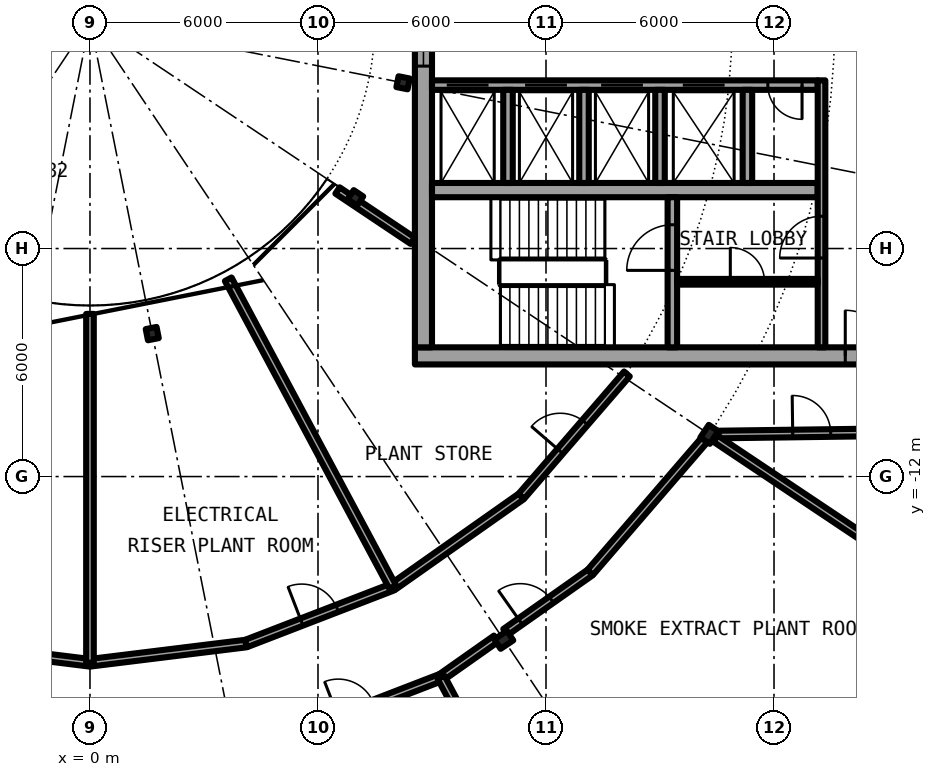
"""IFC4 building model, lengths in metres.
Left out: names, types, materials, properties, quantities, classifications, styles, units other than length and angle.
Written with IfcOpenShell. Run it as: python <this file> out.ifc"""

import sys

from ifc_helpers import new_model, si_unit, direction, frame, frame_2d, origin, origin_2d, place, context, subcontext, project, spatial, rectangle, i_section, extrude, element, fill, save


model = new_model("IFC4")
c1 = context("Model", 3, precision=1e-05, world=origin(), true_north=direction((0.0, 1.0)))
c2 = subcontext(c1, "Body", "Model", "MODEL_VIEW")
j1 = project(units=[si_unit("LENGTHUNIT", "METRE"), si_unit("PLANEANGLEUNIT", "RADIAN")], contexts=[c1])
p1 = place(None, origin())
s1 = spatial("IfcSite", under=j1, at=p1, CompositionType="ELEMENT")
p2 = place(p1, origin())
s2 = spatial("IfcBuilding", under=s1, at=p2, CompositionType="ELEMENT")
p3 = place(p2, frame((0.0, 0.0, 186.0)))
s3 = spatial("IfcBuildingStorey", under=s2, at=p3, CompositionType="ELEMENT", Elevation=186.0)
for number, where, z_axis, x_axis in (
    (1, (10.889, -16.297, 0.0), (0.0, 0.0, 1.0), (0.556, -0.831, 0.0)),
    (2, (16.297, -10.889, 0.0), (0.0, 0.0, 1.0), (0.831, -0.556, 0.0)),
):
    element("IfcColumn", number, at=place(p3, frame(where, z_axis=z_axis, x_axis=x_axis)), inside=s3, PredefinedType="COLUMN", context=c2, shape_type="SweptSolid", body=[
        extrude(i_section(OverallWidth=0.3, OverallDepth=0.4, WebThickness=0.013, FlangeThickness=0.024, FilletRadius=0.027, at=origin_2d()), origin(), (0.0, 0.0, 1.0), 4.2),
    ])
for number, where, z_axis, x_axis in (
    (3, (1.639, -8.239, 0.0), (0.0, 0.0, 1.0), (0.195, -0.981, 0.0)),
    (4, (6.984, -4.667, 0.0), (0.0, 0.0, 1.0), (0.831, -0.556, 0.0)),
    (5, (8.239, -1.639, 0.0), (0.0, 0.0, 1.0), (0.981, -0.195, 0.0)),
):
    element("IfcColumn", number, at=place(p3, frame(where, z_axis=z_axis, x_axis=x_axis)), inside=s3, PredefinedType="COLUMN", context=c2, shape_type="SweptSolid", body=[
        extrude(i_section(OverallWidth=0.3, OverallDepth=0.29, WebThickness=0.009, FlangeThickness=0.014, FilletRadius=0.027, at=origin_2d()), origin(), (0.0, 0.0, 1.0), 4.2),
    ])
p4 = place(p3, frame((8.55, -8.825, 0.0), z_axis=(0.0, 0.0, 1.0), x_axis=(1.0, 0.0, 0.0)))
e6 = element("IfcWall", 6, at=p4, inside=s3, PredefinedType="SHEAR", context=c2, shape_type="SweptSolid", body=[
    extrude(rectangle(XDim=13.5, YDim=0.45, at=frame_2d((6.75, 0.0))), origin(), (0.0, 0.0, 1.0), 4.2),
])
p5 = place(p4, frame((11.325, 0.0, 0.0)))
e7 = element("IfcOpeningElement", 7, at=p5, cuts=e6, PredefinedType="OPENING", context=c2, shape_type="SweptSolid", body=[
    extrude(rectangle(XDim=1.2, YDim=2.3, at=frame_2d((0.6, 1.15))), frame((0.0, 0.235, 0.0), z_axis=(0.0, -1.0, 0.0), x_axis=(1.0, 0.0, 0.0)), (0.0, 0.0, 1.0), 0.47),
])
p6 = place(p3, frame((8.775, -8.6, 0.0), z_axis=(0.0, 0.0, 1.0), x_axis=(0.0, 1.0, 0.0)))
e8 = element("IfcWall", 8, at=p6, inside=s3, PredefinedType="SHEAR", context=c2, shape_type="SweptSolid", body=[
    extrude(rectangle(XDim=17.2, YDim=0.45, at=frame_2d((8.6, 0.0))), origin(), (0.0, 0.0, 1.0), 4.2),
])
p7 = place(p6, frame((7.4, 0.0, 0.1)))
e9 = element("IfcOpeningElement", 9, at=p7, cuts=e8, PredefinedType="OPENING", context=c2, shape_type="SweptSolid", body=[
    extrude(rectangle(XDim=2.4, YDim=2.2, at=frame_2d((1.2, 1.1))), frame((0.0, 0.235, 0.0), z_axis=(0.0, -1.0, 0.0), x_axis=(1.0, 0.0, 0.0)), (0.0, 0.0, 1.0), 0.47),
])
p8 = place(p3, frame((19.15, -1.7, 0.0), z_axis=(0.0, 0.0, 1.0), x_axis=(-1.0, 0.0, 0.0)))
e10 = element("IfcWall", 10, at=p8, inside=s3, PredefinedType="SHEAR", context=c2, shape_type="SweptSolid", body=[
    extrude(rectangle(XDim=10.15, YDim=0.25, at=frame_2d((5.075, 0.0))), origin(), (0.0, 0.0, 1.0), 4.2),
])
p9 = place(p8, frame((8.663, 0.0, 0.0)))
e11 = element("IfcOpeningElement", 11, at=p9, cuts=e10, PredefinedType="OPENING", context=c2, shape_type="SweptSolid", body=[
    extrude(rectangle(XDim=1.1, YDim=2.3, at=frame_2d((0.55, 1.15))), frame((0.0, 0.135, 0.0), z_axis=(0.0, -1.0, 0.0), x_axis=(1.0, 0.0, 0.0)), (0.0, 0.0, 1.0), 0.27),
])
p10 = place(p8, frame((6.6, 0.0, 0.0)))
e12 = element("IfcOpeningElement", 12, at=p10, cuts=e10, PredefinedType="OPENING", context=c2, shape_type="SweptSolid", body=[
    extrude(rectangle(XDim=1.1, YDim=2.3, at=frame_2d((0.55, 1.15))), frame((0.0, 0.135, 0.0), z_axis=(0.0, -1.0, 0.0), x_axis=(1.0, 0.0, 0.0)), (0.0, 0.0, 1.0), 0.27),
])
p11 = place(p8, frame((4.6, 0.0, 0.0)))
e13 = element("IfcOpeningElement", 13, at=p11, cuts=e10, PredefinedType="OPENING", context=c2, shape_type="SweptSolid", body=[
    extrude(rectangle(XDim=1.1, YDim=2.3, at=frame_2d((0.55, 1.15))), frame((0.0, 0.135, 0.0), z_axis=(0.0, -1.0, 0.0), x_axis=(1.0, 0.0, 0.0)), (0.0, 0.0, 1.0), 0.27),
])
p12 = place(p8, frame((2.45, 0.0, 0.0)))
e14 = element("IfcOpeningElement", 14, at=p12, cuts=e10, PredefinedType="OPENING", context=c2, shape_type="SweptSolid", body=[
    extrude(rectangle(XDim=1.1, YDim=2.3, at=frame_2d((0.55, 1.15))), frame((0.0, 0.135, 0.0), z_axis=(0.0, -1.0, 0.0), x_axis=(1.0, 0.0, 0.0)), (0.0, 0.0, 1.0), 0.27),
])
p13 = place(p8, frame((0.413, 0.0, 0.0)))
e15 = element("IfcOpeningElement", 15, at=p13, cuts=e10, PredefinedType="OPENING", context=c2, shape_type="SweptSolid", body=[
    extrude(rectangle(XDim=0.9, YDim=2.3, at=frame_2d((0.45, 1.15))), frame((0.0, 0.135, 0.0), z_axis=(0.0, -1.0, 0.0), x_axis=(1.0, 0.0, 0.0)), (0.0, 0.0, 1.0), 0.27),
])
p14 = place(p3, frame((9.0, -4.462, 0.0), z_axis=(0.0, 0.0, 1.0), x_axis=(1.0, 0.0, 0.0)))
e16 = element("IfcWall", 16, at=p14, inside=s3, PredefinedType="SHEAR", context=c2, shape_type="SweptSolid", body=[
    extrude(rectangle(XDim=10.15, YDim=0.375, at=frame_2d((5.075, 0.0))), origin(), (0.0, 0.0, 1.0), 4.2),
])
p15 = place(p3, frame((15.325, -8.6, 0.0), z_axis=(0.0, 0.0, 1.0), x_axis=(0.0, 1.0, 0.0)))
e17 = element("IfcWall", 17, at=p15, inside=s3, PredefinedType="SHEAR", context=c2, shape_type="SweptSolid", body=[
    extrude(rectangle(XDim=3.95, YDim=0.25, at=frame_2d((1.975, 0.0))), origin(), (0.0, 0.0, 1.0), 4.2),
])
p16 = place(p15, frame((2.025, 0.0, 0.0)))
e18 = element("IfcOpeningElement", 18, at=p16, cuts=e17, PredefinedType="OPENING", context=c2, shape_type="SweptSolid", body=[
    extrude(rectangle(XDim=1.2, YDim=2.3, at=frame_2d((0.6, 1.15))), frame((0.0, 0.135, 0.0), z_axis=(0.0, -1.0, 0.0), x_axis=(1.0, 0.0, 0.0)), (0.0, 0.0, 1.0), 0.27),
])
for number, where, z_axis, x_axis in (
    (19, (15.0, -1.825, 0.0), (0.0, 0.0, 1.0), (0.0, -1.0, 0.0)),
    (20, (17.3, -1.825, 0.0), (0.0, 0.0, 1.0), (0.0, -1.0, 0.0)),
):
    element("IfcWall", number, at=place(p3, frame(where, z_axis=z_axis, x_axis=x_axis)), inside=s3, PredefinedType="SOLIDWALL", context=c2, shape_type="SweptSolid", body=[
        extrude(rectangle(XDim=2.45, YDim=0.25, at=frame_2d((1.225, 0.0))), origin(), (0.0, 0.0, 1.0), 3.85),
    ])
p17 = place(p3, frame((19.25, -8.6, 0.0), z_axis=(0.0, 0.0, 1.0), x_axis=(0.0, 1.0, 0.0)))
e21 = element("IfcWall", 21, at=p17, inside=s3, PredefinedType="SOLIDWALL", context=c2, shape_type="SweptSolid", body=[
    extrude(rectangle(XDim=7.025, YDim=0.2, at=frame_2d((3.513, 0.0))), origin(), (0.0, 0.0, 1.0), 3.85),
])
p18 = place(p17, frame((2.35, 0.0, 0.0)))
e22 = element("IfcOpeningElement", 22, at=p18, cuts=e21, PredefinedType="OPENING", context=c2, shape_type="SweptSolid", body=[
    extrude(rectangle(XDim=1.1, YDim=2.3, at=frame_2d((0.55, 1.15))), frame((0.0, 0.11, 0.0), z_axis=(0.0, -1.0, 0.0), x_axis=(1.0, 0.0, 0.0)), (0.0, 0.0, 1.0), 0.22),
])
for number, where, z_axis, x_axis in (
    (23, (11.0, -1.825, 0.0), (0.0, 0.0, 1.0), (0.0, -1.0, 0.0)),
    (24, (13.0, -1.825, 0.0), (0.0, 0.0, 1.0), (0.0, -1.0, 0.0)),
):
    element("IfcWall", number, at=place(p3, frame(where, z_axis=z_axis, x_axis=x_axis)), inside=s3, PredefinedType="SOLIDWALL", context=c2, shape_type="SweptSolid", body=[
        extrude(rectangle(XDim=2.45, YDim=0.25, at=frame_2d((1.225, 0.0))), origin(), (0.0, 0.0, 1.0), 3.85),
    ])
p19 = place(p3, frame((15.45, -6.875, 0.0), z_axis=(0.0, 0.0, 1.0), x_axis=(1.0, 0.0, 0.0)))
e25 = element("IfcWall", 25, at=p19, inside=s3, PredefinedType="PARTITIONING", context=c2, shape_type="SweptSolid", body=[
    extrude(rectangle(XDim=3.7, YDim=0.15, at=frame_2d((1.85, 0.0))), origin(), (0.0, 0.0, 1.0), 3.85),
])
p20 = place(p19, frame((1.4, 0.0, 0.0)))
e26 = element("IfcOpeningElement", 26, at=p20, cuts=e25, PredefinedType="OPENING", context=c2, shape_type="SweptSolid", body=[
    extrude(rectangle(XDim=0.9, YDim=2.3, at=frame_2d((0.45, 1.15))), frame((0.0, 0.085, 0.0), z_axis=(0.0, -1.0, 0.0), x_axis=(1.0, 0.0, 0.0)), (0.0, 0.0, 1.0), 0.17),
])
p21 = place(p3, frame((4.762, -19.013, 0.0), z_axis=(0.0, 0.0, 1.0), x_axis=(0.932988479706, 0.359906233255, 0.0)))
e27 = element("IfcWall", 27, at=p21, inside=s3, PredefinedType="PARTITIONING", context=c2, shape_type="SweptSolid", body=[
    extrude(rectangle(XDim=4.799, YDim=0.2, at=frame_2d((2.399, 0.0))), origin(), (0.0, 0.0, 1.0), 3.85),
])
p22 = place(p21, frame((1.899, 0.0, 0.0)))
e28 = element("IfcOpeningElement", 28, at=p22, cuts=e27, PredefinedType="OPENING", context=c2, shape_type="SweptSolid", body=[
    extrude(rectangle(XDim=1.0, YDim=2.3, at=frame_2d((0.5, 1.15))), frame((0.0, 0.11, 0.0), z_axis=(0.0, -1.0, 0.0), x_axis=(1.0, 0.0, 0.0)), (0.0, 0.0, 1.0), 0.22),
])
p23 = place(p3, frame((9.239, -17.286, 0.0), z_axis=(0.0, 0.0, 1.0), x_axis=(0.817772792535, 0.575541188613, 0.0)))
e29 = element("IfcWall", 29, at=p23, inside=s3, PredefinedType="PARTITIONING", context=c2, shape_type="SweptSolid", body=[
    extrude(rectangle(XDim=1.772, YDim=0.2, at=frame_2d((0.886, 0.0))), origin(), (0.0, 0.0, 1.0), 3.6),
])
p24 = place(p3, frame((10.933, -16.093, 0.0), z_axis=(0.0, 0.0, 1.0), x_axis=(0.817664396292, 0.57569517545, 0.0)))
e30 = element("IfcWall", 30, at=p24, inside=s3, PredefinedType="PARTITIONING", context=c2, shape_type="SweptSolid", body=[
    extrude(rectangle(XDim=2.727, YDim=0.2, at=frame_2d((1.364, 0.0))), origin(), (0.0, 0.0, 1.0), 3.6),
])
p25 = place(p24, frame((0.478, 0.0, 0.0)))
e31 = element("IfcOpeningElement", 31, at=p25, cuts=e30, PredefinedType="OPENING", context=c2, shape_type="SweptSolid", body=[
    extrude(rectangle(XDim=1.0, YDim=2.3, at=frame_2d((0.5, 1.15))), frame((0.0, 0.11, 0.0), z_axis=(0.0, -1.0, 0.0), x_axis=(1.0, 0.0, 0.0)), (0.0, 0.0, 1.0), 0.22),
])
p26 = place(p3, frame((13.163, -14.523, 0.0), z_axis=(0.0, 0.0, 1.0), x_axis=(0.653094461639, 0.757276451619, 0.0)))
e32 = element("IfcWall", 32, at=p26, inside=s3, PredefinedType="PARTITIONING", context=c2, shape_type="SweptSolid", body=[
    extrude(rectangle(XDim=4.647, YDim=0.2, at=frame_2d((2.323, 0.0))), origin(), (0.0, 0.0, 1.0), 3.6),
])
for number, where, z_axis, x_axis in (
    (33, (-4.106, -16.394, 0.0), (0.0, 0.0, 1.0), (0.992, -0.122, 0.0)),
    (34, (0.0, -16.9, 0.0), (0.0, 0.0, 1.0), (0.992, 0.122, 0.0)),
):
    element("IfcWall", number, at=place(p3, frame(where, z_axis=z_axis, x_axis=x_axis)), inside=s3, PredefinedType="PARTITIONING", context=c2, shape_type="SweptSolid", body=[
        extrude(rectangle(XDim=4.137, YDim=0.2, at=frame_2d((2.068, 0.0))), origin(), (0.0, 0.0, 1.0), 3.85),
    ])
p27 = place(p3, frame((4.106, -16.394, 0.0), z_axis=(0.0, 0.0, 1.0), x_axis=(0.932943640288, 0.360022449363, 0.0)))
e35 = element("IfcWall", 35, at=p27, inside=s3, PredefinedType="PARTITIONING", context=c2, shape_type="SweptSolid", body=[
    extrude(rectangle(XDim=4.139, YDim=0.2, at=frame_2d((2.069, 0.0))), origin(), (0.0, 0.0, 1.0), 3.85),
])
p28 = place(p27, frame((1.569, 0.0, 0.0)))
e36 = element("IfcOpeningElement", 36, at=p28, cuts=e35, PredefinedType="OPENING", context=c2, shape_type="SweptSolid", body=[
    extrude(rectangle(XDim=1.0, YDim=2.3, at=frame_2d((0.5, 1.15))), frame((0.0, 0.11, 0.0), z_axis=(0.0, -1.0, 0.0), x_axis=(1.0, 0.0, 0.0)), (0.0, 0.0, 1.0), 0.22),
])
p29 = place(p3, frame((7.967, -14.904, 0.0), z_axis=(0.0, 0.0, 1.0), x_axis=(0.817567680547, 0.575832517079, 0.0)))
e37 = element("IfcWall", 37, at=p29, inside=s3, PredefinedType="PARTITIONING", context=c2, shape_type="SweptSolid", body=[
    extrude(rectangle(XDim=4.137, YDim=0.2, at=frame_2d((2.068, 0.0))), origin(), (0.0, 0.0, 1.0), 3.85),
])
p30 = place(p3, frame((11.349, -12.522, 0.0), z_axis=(0.0, 0.0, 1.0), x_axis=(0.65324486504, 0.757146713853, 0.0)))
e38 = element("IfcWall", 38, at=p30, inside=s3, PredefinedType="PARTITIONING", context=c2, shape_type="SweptSolid", body=[
    extrude(rectangle(XDim=4.255, YDim=0.2, at=frame_2d((2.128, 0.0))), origin(), (0.0, 0.0, 1.0), 3.85),
])
p31 = place(p30, frame((1.569, 0.0, 0.0)))
e39 = element("IfcOpeningElement", 39, at=p31, cuts=e38, PredefinedType="OPENING", context=c2, shape_type="SweptSolid", body=[
    extrude(rectangle(XDim=1.0, YDim=2.3, at=frame_2d((0.5, 1.15))), frame((0.0, 0.11, 0.0), z_axis=(0.0, -1.0, 0.0), x_axis=(1.0, 0.0, 0.0)), (0.0, 0.0, 1.0), 0.22),
])
p32 = place(p3, frame((16.534, -10.894, 0.0), z_axis=(0.0, 0.0, 1.0), x_axis=(0.999909707888, 0.013437859594, 0.0)))
e40 = element("IfcWall", 40, at=p32, inside=s3, PredefinedType="PARTITIONING", context=c2, shape_type="SweptSolid", body=[
    extrude(rectangle(XDim=5.142, YDim=0.2, at=frame_2d((2.571, 0.0))), origin(), (0.0, 0.0, 1.0), 3.85),
])
p33 = place(p32, frame((1.958, 0.0, 0.0)))
e41 = element("IfcOpeningElement", 41, at=p33, cuts=e40, PredefinedType="OPENING", context=c2, shape_type="SweptSolid", body=[
    extrude(rectangle(XDim=1.0, YDim=2.3, at=frame_2d((0.5, 1.15))), frame((0.0, 0.11, 0.0), z_axis=(0.0, -1.0, 0.0), x_axis=(1.0, 0.0, 0.0)), (0.0, 0.0, 1.0), 0.22),
])
p34 = place(p3, frame((6.513, -4.472, 0.0), z_axis=(0.0, 0.0, 1.0), x_axis=(0.831403409976, -0.555669299026, 0.0)))
e42 = element("IfcWall", 42, at=p34, inside=s3, PredefinedType="PARTITIONING", context=c2, shape_type="SweptSolid", body=[
    extrude(rectangle(XDim=2.383, YDim=0.2, at=frame_2d((1.191, 0.0))), origin(), (0.0, 0.0, 1.0), 3.85),
])
p35 = place(p3, frame((0.0, -16.9, 0.0), z_axis=(0.0, 0.0, 1.0), x_axis=(0.0, 1.0, 0.0)))
e43 = element("IfcWall", 43, at=p35, inside=s3, PredefinedType="PARTITIONING", context=c2, shape_type="SweptSolid", body=[
    extrude(rectangle(XDim=9.18, YDim=0.2, at=frame_2d((4.59, 0.0))), origin(), (0.0, 0.0, 1.0), 3.85),
])
p36 = place(p3, frame((3.638, -6.809, 0.0), z_axis=(0.0, 0.0, 1.0), x_axis=(0.471460365694, -0.881887251059, 0.0)))
e44 = element("IfcWall", 44, at=p36, inside=s3, PredefinedType="PARTITIONING", context=c2, shape_type="SweptSolid", body=[
    extrude(rectangle(XDim=9.18, YDim=0.2, at=frame_2d((4.59, 0.0))), origin(), (0.0, 0.0, 1.0), 3.85),
])
p37 = place(p3, frame((9.239, -17.286, 0.0), z_axis=(0.0, 0.0, 1.0), x_axis=(0.471439510802, -0.881898399848, 0.0)))
e45 = element("IfcWall", 45, at=p37, inside=s3, PredefinedType="PARTITIONING", context=c2, shape_type="SweptSolid", body=[
    extrude(rectangle(XDim=7.575, YDim=0.2, at=frame_2d((3.787, 0.0))), origin(), (0.0, 0.0, 1.0), 3.85),
])
p38 = place(p3, frame((16.461, -11.003, 0.0), z_axis=(0.0, 0.0, 1.0), x_axis=(0.831418274402, -0.555647057933, 0.0)))
e46 = element("IfcWall", 46, at=p38, inside=s3, PredefinedType="PARTITIONING", context=c2, shape_type="SweptSolid", body=[
    extrude(rectangle(XDim=7.375, YDim=0.2, at=frame_2d((3.688, 0.0))), origin(), (0.0, 0.0, 1.0), 3.85),
])
p39 = place(p9, origin())
e47 = element("IfcDoor", 47, at=p39, inside=s3, OperationType="DOUBLE_DOOR_SLIDING", PredefinedType="DOOR", context=c2, shape_type="SweptSolid", body=[
    extrude(rectangle(XDim=1.1, YDim=2.3, at=frame_2d((0.55, 1.15))), frame((0.0, 0.025, 0.0), z_axis=(0.0, -1.0, 0.0), x_axis=(1.0, 0.0, 0.0)), (0.0, 0.0, 1.0), 0.05),
])
fill(e11, e47)
p40 = place(p10, origin())
e48 = element("IfcDoor", 48, at=p40, inside=s3, OperationType="DOUBLE_DOOR_SLIDING", PredefinedType="DOOR", context=c2, shape_type="SweptSolid", body=[
    extrude(rectangle(XDim=1.1, YDim=2.3, at=frame_2d((0.55, 1.15))), frame((0.0, 0.025, 0.0), z_axis=(0.0, -1.0, 0.0), x_axis=(1.0, 0.0, 0.0)), (0.0, 0.0, 1.0), 0.05),
])
fill(e12, e48)
p41 = place(p11, origin())
e49 = element("IfcDoor", 49, at=p41, inside=s3, OperationType="DOUBLE_DOOR_SLIDING", PredefinedType="DOOR", context=c2, shape_type="SweptSolid", body=[
    extrude(rectangle(XDim=1.1, YDim=2.3, at=frame_2d((0.55, 1.15))), frame((0.0, 0.025, 0.0), z_axis=(0.0, -1.0, 0.0), x_axis=(1.0, 0.0, 0.0)), (0.0, 0.0, 1.0), 0.05),
])
fill(e13, e49)
p42 = place(p12, origin())
e50 = element("IfcDoor", 50, at=p42, inside=s3, OperationType="DOUBLE_DOOR_SLIDING", PredefinedType="DOOR", context=c2, shape_type="SweptSolid", body=[
    extrude(rectangle(XDim=1.1, YDim=2.3, at=frame_2d((0.55, 1.15))), frame((0.0, 0.025, 0.0), z_axis=(0.0, -1.0, 0.0), x_axis=(1.0, 0.0, 0.0)), (0.0, 0.0, 1.0), 0.05),
])
fill(e14, e50)
p43 = place(p13, origin())
e51 = element("IfcDoor", 51, at=p43, inside=s3, OperationType="SINGLE_SWING_RIGHT", PredefinedType="DOOR", context=c2, shape_type="SweptSolid", body=[
    extrude(rectangle(XDim=0.9, YDim=2.3, at=frame_2d((0.45, 1.15))), frame((0.0, 0.025, 0.0), z_axis=(0.0, -1.0, 0.0), x_axis=(1.0, 0.0, 0.0)), (0.0, 0.0, 1.0), 0.05),
])
fill(e15, e51)
p44 = place(p20, origin())
e52 = element("IfcDoor", 52, at=p44, inside=s3, OperationType="SINGLE_SWING_LEFT", PredefinedType="DOOR", context=c2, shape_type="SweptSolid", body=[
    extrude(rectangle(XDim=0.9, YDim=2.3, at=frame_2d((0.45, 1.15))), frame((0.0, 0.025, 0.0), z_axis=(0.0, -1.0, 0.0), x_axis=(1.0, 0.0, 0.0)), (0.0, 0.0, 1.0), 0.05),
])
fill(e26, e52)
p45 = place(p16, origin())
e53 = element("IfcDoor", 53, at=p45, inside=s3, OperationType="SINGLE_SWING_LEFT", PredefinedType="DOOR", context=c2, shape_type="SweptSolid", body=[
    extrude(rectangle(XDim=1.2, YDim=2.3, at=frame_2d((0.6, 1.15))), frame((0.0, 0.025, 0.0), z_axis=(0.0, -1.0, 0.0), x_axis=(1.0, 0.0, 0.0)), (0.0, 0.0, 1.0), 0.05),
])
fill(e18, e53)
p46 = place(p18, origin())
e54 = element("IfcDoor", 54, at=p46, inside=s3, OperationType="SINGLE_SWING_RIGHT", PredefinedType="DOOR", context=c2, shape_type="SweptSolid", body=[
    extrude(rectangle(XDim=1.1, YDim=2.3, at=frame_2d((0.55, 1.15))), frame((0.0, 0.025, 0.0), z_axis=(0.0, -1.0, 0.0), x_axis=(1.0, 0.0, 0.0)), (0.0, 0.0, 1.0), 0.05),
])
fill(e22, e54)
p47 = place(p5, origin())
e55 = element("IfcDoor", 55, at=p47, inside=s3, OperationType="SINGLE_SWING_LEFT", PredefinedType="DOOR", context=c2, shape_type="SweptSolid", body=[
    extrude(rectangle(XDim=1.2, YDim=2.3, at=frame_2d((0.6, 1.15))), frame((0.0, 0.025, 0.0), z_axis=(0.0, -1.0, 0.0), x_axis=(1.0, 0.0, 0.0)), (0.0, 0.0, 1.0), 0.05),
])
fill(e7, e55)
p48 = place(p7, origin())
e56 = element("IfcWindow", 56, at=p48, inside=s3, PartitioningType="SINGLE_PANEL", PredefinedType="WINDOW", context=c2, shape_type="SweptSolid", body=[
    extrude(rectangle(XDim=2.4, YDim=2.2, at=frame_2d((1.2, 1.1))), frame((0.0, 0.03, 0.0), z_axis=(0.0, -1.0, 0.0), x_axis=(1.0, 0.0, 0.0)), (0.0, 0.0, 1.0), 0.06),
])
fill(e9, e56)
p49 = place(p25, origin())
e57 = element("IfcDoor", 57, at=p49, inside=s3, OperationType="SINGLE_SWING_LEFT", PredefinedType="DOOR", context=c2, shape_type="SweptSolid", body=[
    extrude(rectangle(XDim=1.0, YDim=2.3, at=frame_2d((0.5, 1.15))), frame((0.0, 0.025, 0.0), z_axis=(0.0, -1.0, 0.0), x_axis=(1.0, 0.0, 0.0)), (0.0, 0.0, 1.0), 0.05),
])
fill(e31, e57)
p50 = place(p28, origin())
e58 = element("IfcDoor", 58, at=p50, inside=s3, OperationType="SINGLE_SWING_RIGHT", PredefinedType="DOOR", context=c2, shape_type="SweptSolid", body=[
    extrude(rectangle(XDim=1.0, YDim=2.3, at=frame_2d((0.5, 1.15))), frame((0.0, 0.025, 0.0), z_axis=(0.0, -1.0, 0.0), x_axis=(1.0, 0.0, 0.0)), (0.0, 0.0, 1.0), 0.05),
])
fill(e36, e58)
p51 = place(p31, origin())
e59 = element("IfcDoor", 59, at=p51, inside=s3, OperationType="SINGLE_SWING_RIGHT", PredefinedType="DOOR", context=c2, shape_type="SweptSolid", body=[
    extrude(rectangle(XDim=1.0, YDim=2.3, at=frame_2d((0.5, 1.15))), frame((0.0, 0.025, 0.0), z_axis=(0.0, -1.0, 0.0), x_axis=(1.0, 0.0, 0.0)), (0.0, 0.0, 1.0), 0.05),
])
fill(e39, e59)
p52 = place(p33, origin())
e60 = element("IfcDoor", 60, at=p52, inside=s3, OperationType="SINGLE_SWING_LEFT", PredefinedType="DOOR", context=c2, shape_type="SweptSolid", body=[
    extrude(rectangle(XDim=1.0, YDim=2.3, at=frame_2d((0.5, 1.15))), frame((0.0, 0.025, 0.0), z_axis=(0.0, -1.0, 0.0), x_axis=(1.0, 0.0, 0.0)), (0.0, 0.0, 1.0), 0.05),
])
fill(e41, e60)
save(model, sys.argv[1])
